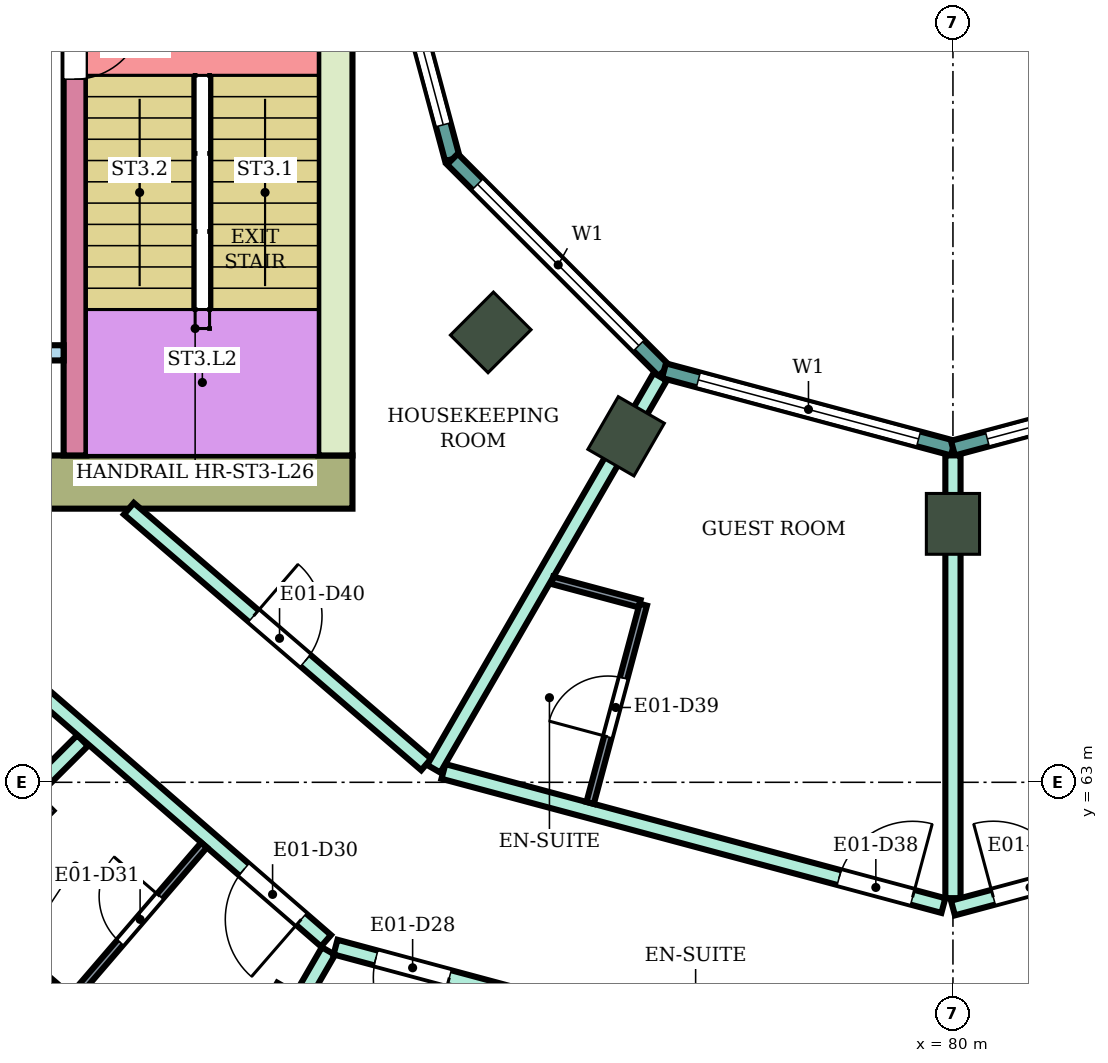
"""IFC4 building model, lengths in metres.
Left out: names, types, materials, properties, quantities, classifications, styles, units other than length and angle.
Written with IfcOpenShell. Run it as: python <this file> out.ifc"""

import sys

from ifc_helpers import new_model, si_unit, direction, frame, frame_2d, origin, origin_2d, place, context, subcontext, project, spatial, rectangle, extrude, element, fill, save


model = new_model("IFC4")
c1 = context("Model", 3, precision=1e-05, world=origin(), true_north=direction((0.0, 1.0)))
c2 = subcontext(c1, "Body", "Model", "MODEL_VIEW")
j1 = project(units=[si_unit("LENGTHUNIT", "METRE"), si_unit("PLANEANGLEUNIT", "RADIAN")], contexts=[c1])
p1 = place(None, origin())
s1 = spatial("IfcSite", under=j1, at=p1, CompositionType="ELEMENT")
p2 = place(p1, origin())
s2 = spatial("IfcBuilding", under=s1, at=p2, CompositionType="ELEMENT")
p3 = place(p2, frame((0.0, 0.0, 114.6)))
s3 = spatial("IfcBuildingStorey", under=s2, at=p3, CompositionType="ELEMENT", Elevation=114.6)
for number, where, z_axis, x_axis in (
    (1, (67.555, 62.555, 0.0), (0.0, 0.0, 1.0), (-0.707, -0.707, 0.0)),
    (2, (71.2, 59.758, 0.0), (0.0, 0.0, 1.0), (-0.5, -0.866, 0.0)),
):
    element("IfcColumn", number, at=place(p3, frame(where, z_axis=z_axis, x_axis=x_axis)), inside=s3, PredefinedType="COLUMN", context=c2, shape_type="SweptSolid", body=[
        extrude(rectangle(XDim=1.0, YDim=0.8, at=origin_2d()), origin(), (0.0, 0.0, 1.0), 3.9),
    ])
for number, where, z_axis, x_axis in (
    (3, (73.919, 68.919, 0.0), (0.0, 0.0, 1.0), (-0.707, -0.707, 0.0)),
    (4, (75.7, 67.552, 0.0), (0.0, 0.0, 1.0), (-0.5, -0.866, 0.0)),
    (5, (80.0, 66.4, 0.0), (0.0, 0.0, 1.0), (0.0, -1.0, 0.0)),
):
    element("IfcColumn", number, at=place(p3, frame(where, z_axis=z_axis, x_axis=x_axis)), inside=s3, PredefinedType="COLUMN", context=c2, shape_type="SweptSolid", body=[
        extrude(rectangle(XDim=0.8, YDim=0.7, at=origin_2d()), origin(), (0.0, 0.0, 1.0), 3.9),
    ])
p4 = place(p3, frame((72.1, 66.95, 0.0), z_axis=(0.0, 0.0, 1.0), x_axis=(-1.0, 0.0, 0.0)))
e6 = element("IfcWall", 6, at=p4, inside=s3, PredefinedType="SHEAR", context=c2, shape_type="SweptSolid", body=[
    extrude(rectangle(XDim=14.8, YDim=0.7, at=frame_2d((7.4, 0.0))), origin(), (0.0, 0.0, 1.0), 3.58),
])
p5 = place(p4, frame((4.2, 0.0, 0.0)))
e7 = element("IfcOpeningElement", 7, at=p5, cuts=e6, PredefinedType="OPENING", context=c2, shape_type="SweptSolid", body=[
    extrude(rectangle(XDim=2.4, YDim=2.4, at=frame_2d((1.2, 1.2))), frame((0.0, 0.36, 0.0), z_axis=(0.0, -1.0, 0.0), x_axis=(1.0, 0.0, 0.0)), (0.0, 0.0, 1.0), 0.72),
])
p6 = place(p3, frame((71.875, 75.0, 0.0), z_axis=(0.0, 0.0, 1.0), x_axis=(0.0, -1.0, 0.0)))
e8 = element("IfcWall", 8, at=p6, inside=s3, PredefinedType="SHEAR", context=c2, shape_type="SweptSolid", body=[
    extrude(rectangle(XDim=7.7, YDim=0.45, at=frame_2d((3.85, 0.0))), origin(), (0.0, 0.0, 1.0), 3.58),
])
p7 = place(p3, frame((68.45, 75.0, 0.0), z_axis=(0.0, 0.0, 1.0), x_axis=(0.0, -1.0, 0.0)))
e9 = element("IfcWall", 9, at=p7, inside=s3, PredefinedType="SHEAR", context=c2, shape_type="SweptSolid", body=[
    extrude(rectangle(XDim=7.7, YDim=0.3, at=frame_2d((3.85, 0.0))), origin(), (0.0, 0.0, 1.0), 3.58),
])
p8 = place(p7, frame((1.85, 0.0, 0.0)))
e10 = element("IfcOpeningElement", 10, at=p8, cuts=e9, PredefinedType="OPENING", context=c2, shape_type="SweptSolid", body=[
    extrude(rectangle(XDim=0.9, YDim=2.1, at=frame_2d((0.45, 1.05))), frame((0.0, 0.16, 0.0), z_axis=(0.0, -1.0, 0.0), x_axis=(1.0, 0.0, 0.0)), (0.0, 0.0, 1.0), 0.32),
])
p9 = place(p3, frame((68.3, 68.65, 0.0), z_axis=(0.0, 0.0, 1.0), x_axis=(-1.0, 0.0, 0.0)))
e11 = element("IfcWall", 11, at=p9, inside=s3, PredefinedType="SHEAR", context=c2, shape_type="SweptSolid", body=[
    extrude(rectangle(XDim=4.5, YDim=0.2, at=frame_2d((2.25, 0.0))), origin(), (0.0, 0.0, 1.0), 3.58),
])
p10 = place(p3, frame((72.396, 75.0, 0.0), z_axis=(0.0, 0.0, 1.0), x_axis=(0.258789828301, -0.965933654434, 0.0)))
e12 = element("IfcWall", 12, at=p10, inside=s3, PredefinedType="NOTDEFINED", context=c2, shape_type="SweptSolid", body=[
    extrude(rectangle(XDim=3.936, YDim=0.2, at=frame_2d((1.968, 0.0))), origin(), (0.0, 0.0, 1.0), 3.9),
])
p11 = place(p10, frame((0.468, 0.0, 0.9)))
e13 = element("IfcOpeningElement", 13, at=p11, cuts=e12, PredefinedType="OPENING", context=c2, shape_type="SweptSolid", body=[
    extrude(rectangle(XDim=3.0, YDim=2.3, at=frame_2d((1.5, 1.15))), frame((0.0, 0.11, 0.0), z_axis=(0.0, -1.0, 0.0), x_axis=(1.0, 0.0, 0.0)), (0.0, 0.0, 1.0), 0.22),
])
p12 = place(p3, frame((73.415, 71.198, 0.0), z_axis=(0.0, 0.0, 1.0), x_axis=(0.707106781187, -0.707106781187, 0.0)))
e14 = element("IfcWall", 14, at=p12, inside=s3, PredefinedType="NOTDEFINED", context=c2, shape_type="SweptSolid", body=[
    extrude(rectangle(XDim=3.936, YDim=0.2, at=frame_2d((1.968, 0.0))), origin(), (0.0, 0.0, 1.0), 3.9),
])
p13 = place(p12, frame((0.468, 0.0, 0.9)))
e15 = element("IfcOpeningElement", 15, at=p13, cuts=e14, PredefinedType="OPENING", context=c2, shape_type="SweptSolid", body=[
    extrude(rectangle(XDim=3.0, YDim=2.3, at=frame_2d((1.5, 1.15))), frame((0.0, 0.11, 0.0), z_axis=(0.0, -1.0, 0.0), x_axis=(1.0, 0.0, 0.0)), (0.0, 0.0, 1.0), 0.22),
])
p14 = place(p3, frame((76.198, 68.415, 0.0), z_axis=(0.0, 0.0, 1.0), x_axis=(0.965933654434, -0.258789828301, 0.0)))
e16 = element("IfcWall", 16, at=p14, inside=s3, PredefinedType="NOTDEFINED", context=c2, shape_type="SweptSolid", body=[
    extrude(rectangle(XDim=3.936, YDim=0.2, at=frame_2d((1.968, 0.0))), origin(), (0.0, 0.0, 1.0), 3.9),
])
p15 = place(p14, frame((0.468, 0.0, 0.9)))
e17 = element("IfcOpeningElement", 17, at=p15, cuts=e16, PredefinedType="OPENING", context=c2, shape_type="SweptSolid", body=[
    extrude(rectangle(XDim=3.0, YDim=2.3, at=frame_2d((1.5, 1.15))), frame((0.0, 0.11, 0.0), z_axis=(0.0, -1.0, 0.0), x_axis=(1.0, 0.0, 0.0)), (0.0, 0.0, 1.0), 0.22),
])
p16 = place(p3, frame((80.0, 67.396, 0.0), z_axis=(0.0, 0.0, 1.0), x_axis=(0.965933654434, 0.258789828301, 0.0)))
e18 = element("IfcWall", 18, at=p16, inside=s3, PredefinedType="NOTDEFINED", context=c2, shape_type="SweptSolid", body=[
    extrude(rectangle(XDim=3.936, YDim=0.2, at=frame_2d((1.968, 0.0))), origin(), (0.0, 0.0, 1.0), 3.9),
])
p17 = place(p16, frame((0.468, 0.0, 0.9)))
e19 = element("IfcOpeningElement", 19, at=p17, cuts=e18, PredefinedType="OPENING", context=c2, shape_type="SweptSolid", body=[
    extrude(rectangle(XDim=3.0, YDim=2.3, at=frame_2d((1.5, 1.15))), frame((0.0, 0.11, 0.0), z_axis=(0.0, -1.0, 0.0), x_axis=(1.0, 0.0, 0.0)), (0.0, 0.0, 1.0), 0.22),
])
p18 = place(p3, frame((63.596, 58.596, 0.0), z_axis=(0.0, 0.0, 1.0), x_axis=(0.707106781187, 0.707106781187, 0.0)))
e20 = element("IfcWall", 20, at=p18, inside=s3, PredefinedType="PARTITIONING", context=c2, shape_type="SweptSolid", body=[
    extrude(rectangle(XDim=7.005, YDim=0.2, at=frame_2d((3.503, 0.0))), origin(), (0.0, 0.0, 1.0), 3.45),
])
p19 = place(p3, frame((67.081, 64.971, 0.0), z_axis=(0.0, 0.0, 1.0), x_axis=(0.755031061605, -0.65568902386, 0.0)))
e21 = element("IfcWall", 21, at=p19, inside=s3, PredefinedType="PARTITIONING", context=c2, shape_type="SweptSolid", body=[
    extrude(rectangle(XDim=6.186, YDim=0.2, at=frame_2d((3.093, 0.0))), origin(), (0.0, 0.0, 1.0), 3.45),
])
p20 = place(p19, frame((4.755, 0.0, 0.0)))
e22 = element("IfcOpeningElement", 22, at=p20, cuts=e21, PredefinedType="OPENING", context=c2, shape_type="SweptSolid", body=[
    extrude(rectangle(XDim=1.0, YDim=2.1, at=frame_2d((0.5, 1.05))), frame((0.0, 0.11, 0.0), z_axis=(0.0, -1.0, 0.0), x_axis=(1.0, 0.0, 0.0)), (0.0, 0.0, 1.0), 0.22),
])
p21 = place(p3, frame((67.094, 52.663, 0.0), z_axis=(0.0, 0.0, 1.0), x_axis=(0.500228134253, 0.865893650342, 0.0)))
e23 = element("IfcWall", 23, at=p21, inside=s3, PredefinedType="PARTITIONING", context=c2, shape_type="SweptSolid", body=[
    extrude(rectangle(XDim=9.375, YDim=0.2, at=frame_2d((4.687, 0.0))), origin(), (0.0, 0.0, 1.0), 3.45),
])
p22 = place(p3, frame((69.158, 66.6, 0.0), z_axis=(0.0, 0.0, 1.0), x_axis=(0.758063092745, -0.652181222835, 0.0)))
e24 = element("IfcWall", 24, at=p22, inside=s3, PredefinedType="PARTITIONING", context=c2, shape_type="SweptSolid", body=[
    extrude(rectangle(XDim=5.16, YDim=0.2, at=frame_2d((2.58, 0.0))), origin(), (0.0, 0.0, 1.0), 3.45),
])
p23 = place(p22, frame((2.165, 0.0, 0.0)))
e25 = element("IfcOpeningElement", 25, at=p23, cuts=e24, PredefinedType="OPENING", context=c2, shape_type="SweptSolid", body=[
    extrude(rectangle(XDim=0.9, YDim=2.1, at=frame_2d((0.45, 1.05))), frame((0.0, 0.11, 0.0), z_axis=(0.0, -1.0, 0.0), x_axis=(1.0, 0.0, 0.0)), (0.0, 0.0, 1.0), 0.22),
])
p24 = place(p3, frame((71.877, 60.832, 0.0), z_axis=(0.0, 0.0, 1.0), x_axis=(0.965857276008, -0.259074742848, 0.0)))
e26 = element("IfcWall", 26, at=p24, inside=s3, PredefinedType="PARTITIONING", context=c2, shape_type="SweptSolid", body=[
    extrude(rectangle(XDim=8.36, YDim=0.2, at=frame_2d((4.18, 0.0))), origin(), (0.0, 0.0, 1.0), 3.45),
])
p25 = place(p24, frame((0.55, 0.0, 0.0)))
e27 = element("IfcOpeningElement", 27, at=p25, cuts=e26, PredefinedType="OPENING", context=c2, shape_type="SweptSolid", body=[
    extrude(rectangle(XDim=1.0, YDim=2.1, at=frame_2d((0.5, 1.05))), frame((0.0, 0.11, 0.0), z_axis=(0.0, -1.0, 0.0), x_axis=(1.0, 0.0, 0.0)), (0.0, 0.0, 1.0), 0.22),
])
p26 = place(p3, frame((73.297, 63.143, 0.0), z_axis=(0.0, 0.0, 1.0), x_axis=(0.965859030528, -0.25906820173, 0.0)))
e28 = element("IfcWall", 28, at=p26, inside=s3, PredefinedType="PARTITIONING", context=c2, shape_type="SweptSolid", body=[
    extrude(rectangle(XDim=6.81, YDim=0.2, at=frame_2d((3.405, 0.0))), origin(), (0.0, 0.0, 1.0), 3.45),
])
p27 = place(p26, frame((5.39, 0.0, 0.0)))
e29 = element("IfcOpeningElement", 29, at=p27, cuts=e28, PredefinedType="OPENING", context=c2, shape_type="SweptSolid", body=[
    extrude(rectangle(XDim=1.0, YDim=2.1, at=frame_2d((0.5, 1.05))), frame((0.0, 0.11, 0.0), z_axis=(0.0, -1.0, 0.0), x_axis=(1.0, 0.0, 0.0)), (0.0, 0.0, 1.0), 0.22),
])
p28 = place(p3, frame((73.169, 63.178, 0.0), z_axis=(0.0, 0.0, 1.0), x_axis=(0.500239348149, 0.865887171959, 0.0)))
e30 = element("IfcWall", 30, at=p28, inside=s3, PredefinedType="PARTITIONING", context=c2, shape_type="SweptSolid", body=[
    extrude(rectangle(XDim=5.955, YDim=0.2, at=frame_2d((2.978, 0.0))), origin(), (0.0, 0.0, 1.0), 3.45),
])
p29 = place(p3, frame((80.0, 58.655, 0.0), z_axis=(0.0, 0.0, 1.0), x_axis=(0.965967338894, 0.258664068224, 0.0)))
e31 = element("IfcWall", 31, at=p29, inside=s3, PredefinedType="PARTITIONING", context=c2, shape_type="SweptSolid", body=[
    extrude(rectangle(XDim=8.36, YDim=0.2, at=frame_2d((4.18, 0.0))), origin(), (0.0, 0.0, 1.0), 3.45),
])
p30 = place(p29, frame((6.86, 0.0, 0.0)))
e32 = element("IfcOpeningElement", 32, at=p30, cuts=e31, PredefinedType="OPENING", context=c2, shape_type="SweptSolid", body=[
    extrude(rectangle(XDim=1.0, YDim=2.1, at=frame_2d((0.5, 1.05))), frame((0.0, 0.11, 0.0), z_axis=(0.0, -1.0, 0.0), x_axis=(1.0, 0.0, 0.0)), (0.0, 0.0, 1.0), 0.22),
])
p31 = place(p29, frame((2.7, 0.0, 0.0)))
e33 = element("IfcOpeningElement", 33, at=p31, cuts=e31, PredefinedType="OPENING", context=c2, shape_type="SweptSolid", body=[
    extrude(rectangle(XDim=1.0, YDim=2.1, at=frame_2d((0.5, 1.05))), frame((0.0, 0.11, 0.0), z_axis=(0.0, -1.0, 0.0), x_axis=(1.0, 0.0, 0.0)), (0.0, 0.0, 1.0), 0.22),
])
p32 = place(p3, frame((80.0, 61.476, 0.0), z_axis=(0.0, 0.0, 1.0), x_axis=(0.0, 1.0, 0.0)))
e34 = element("IfcWall", 34, at=p32, inside=s3, PredefinedType="PARTITIONING", context=c2, shape_type="SweptSolid", body=[
    extrude(rectangle(XDim=5.825, YDim=0.2, at=frame_2d((2.913, 0.0))), origin(), (0.0, 0.0, 1.0), 3.45),
])
p33 = place(p3, frame((80.0, 61.346, 0.0), z_axis=(0.0, 0.0, 1.0), x_axis=(0.965924181808, 0.258825182312, 0.0)))
e35 = element("IfcWall", 35, at=p33, inside=s3, PredefinedType="PARTITIONING", context=c2, shape_type="SweptSolid", body=[
    extrude(rectangle(XDim=6.94, YDim=0.2, at=frame_2d((3.47, 0.0))), origin(), (0.0, 0.0, 1.0), 3.45),
])
p34 = place(p33, frame((0.55, 0.0, 0.0)))
e36 = element("IfcOpeningElement", 36, at=p34, cuts=e35, PredefinedType="OPENING", context=c2, shape_type="SweptSolid", body=[
    extrude(rectangle(XDim=1.0, YDim=2.1, at=frame_2d((0.5, 1.05))), frame((0.0, 0.11, 0.0), z_axis=(0.0, -1.0, 0.0), x_axis=(1.0, 0.0, 0.0)), (0.0, 0.0, 1.0), 0.22),
])
p35 = place(p3, frame((65.209, 62.875, 0.0), z_axis=(0.0, 0.0, 1.0), x_axis=(0.757930378138, -0.652335451969, 0.0)))
e37 = element("IfcWall", 37, at=p35, inside=s3, PredefinedType="PARTITIONING", context=c2, shape_type="SweptSolid", body=[
    extrude(rectangle(XDim=4.15, YDim=0.1, at=frame_2d((2.075, 0.0))), origin(), (0.0, 0.0, 1.0), 3.45),
])
p36 = place(p3, frame((68.393, 60.135, 0.0), z_axis=(0.0, 0.0, 1.0), x_axis=(0.652061182569, 0.758166349944, 0.0)))
e38 = element("IfcWall", 38, at=p36, inside=s3, PredefinedType="PARTITIONING", context=c2, shape_type="SweptSolid", body=[
    extrude(rectangle(XDim=2.69, YDim=0.1, at=frame_2d((1.345, 0.0))), origin(), (0.0, 0.0, 1.0), 3.45),
])
p37 = place(p36, frame((1.0, 0.0, 0.0)))
e39 = element("IfcOpeningElement", 39, at=p37, cuts=e38, PredefinedType="OPENING", context=c2, shape_type="SweptSolid", body=[
    extrude(rectangle(XDim=0.8, YDim=2.1, at=frame_2d((0.4, 1.05))), frame((0.0, 0.06, 0.0), z_axis=(0.0, -1.0, 0.0), x_axis=(1.0, 0.0, 0.0)), (0.0, 0.0, 1.0), 0.12),
])
p38 = place(p3, frame((74.729, 65.657, 0.0), z_axis=(0.0, 0.0, 1.0), x_axis=(0.965948051503, -0.258736085224, 0.0)))
e40 = element("IfcWall", 40, at=p38, inside=s3, PredefinedType="PARTITIONING", context=c2, shape_type="SweptSolid", body=[
    extrude(rectangle(XDim=1.189, YDim=0.1, at=frame_2d((0.594, 0.0))), origin(), (0.0, 0.0, 1.0), 3.45),
])
p39 = place(p3, frame((75.227, 62.729, 0.0), z_axis=(0.0, 0.0, 1.0), x_axis=(0.258945475746, 0.965891940432, 0.0)))
e41 = element("IfcWall", 41, at=p39, inside=s3, PredefinedType="PARTITIONING", context=c2, shape_type="SweptSolid", body=[
    extrude(rectangle(XDim=2.7, YDim=0.1, at=frame_2d((1.35, 0.0))), origin(), (0.0, 0.0, 1.0), 3.45),
])
p40 = place(p39, frame((0.9, 0.0, 0.0)))
e42 = element("IfcOpeningElement", 42, at=p40, cuts=e41, PredefinedType="OPENING", context=c2, shape_type="SweptSolid", body=[
    extrude(rectangle(XDim=0.8, YDim=2.1, at=frame_2d((0.4, 1.05))), frame((0.0, 0.06, 0.0), z_axis=(0.0, -1.0, 0.0), x_axis=(1.0, 0.0, 0.0)), (0.0, 0.0, 1.0), 0.12),
])
p41 = place(p11, origin())
e43 = element("IfcWindow", 43, at=p41, inside=s3, PartitioningType="SINGLE_PANEL", PredefinedType="WINDOW", context=c2, shape_type="SweptSolid", body=[
    extrude(rectangle(XDim=3.0, YDim=2.3, at=frame_2d((1.5, 1.15))), frame((0.0, 0.03, 0.0), z_axis=(0.0, -1.0, 0.0), x_axis=(1.0, 0.0, 0.0)), (0.0, 0.0, 1.0), 0.06),
])
fill(e13, e43)
p42 = place(p13, origin())
e44 = element("IfcWindow", 44, at=p42, inside=s3, PartitioningType="SINGLE_PANEL", PredefinedType="WINDOW", context=c2, shape_type="SweptSolid", body=[
    extrude(rectangle(XDim=3.0, YDim=2.3, at=frame_2d((1.5, 1.15))), frame((0.0, 0.03, 0.0), z_axis=(0.0, -1.0, 0.0), x_axis=(1.0, 0.0, 0.0)), (0.0, 0.0, 1.0), 0.06),
])
fill(e15, e44)
p43 = place(p15, origin())
e45 = element("IfcWindow", 45, at=p43, inside=s3, PartitioningType="SINGLE_PANEL", PredefinedType="WINDOW", context=c2, shape_type="SweptSolid", body=[
    extrude(rectangle(XDim=3.0, YDim=2.3, at=frame_2d((1.5, 1.15))), frame((0.0, 0.03, 0.0), z_axis=(0.0, -1.0, 0.0), x_axis=(1.0, 0.0, 0.0)), (0.0, 0.0, 1.0), 0.06),
])
fill(e17, e45)
p44 = place(p17, origin())
e46 = element("IfcWindow", 46, at=p44, inside=s3, PartitioningType="SINGLE_PANEL", PredefinedType="WINDOW", context=c2, shape_type="SweptSolid", body=[
    extrude(rectangle(XDim=3.0, YDim=2.3, at=frame_2d((1.5, 1.15))), frame((0.0, 0.03, 0.0), z_axis=(0.0, -1.0, 0.0), x_axis=(1.0, 0.0, 0.0)), (0.0, 0.0, 1.0), 0.06),
])
fill(e19, e46)
p45 = place(p25, frame((1.0, 0.0, 0.0), z_axis=(0.0, 0.0, 1.0), x_axis=(-1.0, 0.0, 0.0)))
e47 = element("IfcDoor", 47, at=p45, inside=s3, OperationType="SINGLE_SWING_LEFT", PredefinedType="DOOR", context=c2, shape_type="SweptSolid", body=[
    extrude(rectangle(XDim=1.0, YDim=2.1, at=frame_2d((0.5, 1.05))), frame((0.0, 0.025, 0.0), z_axis=(0.0, -1.0, 0.0), x_axis=(1.0, 0.0, 0.0)), (0.0, 0.0, 1.0), 0.05),
])
fill(e27, e47)
p46 = place(p20, frame((1.0, 0.0, 0.0), z_axis=(0.0, 0.0, 1.0), x_axis=(-1.0, 0.0, 0.0)))
e48 = element("IfcDoor", 48, at=p46, inside=s3, OperationType="SINGLE_SWING_LEFT", PredefinedType="DOOR", context=c2, shape_type="SweptSolid", body=[
    extrude(rectangle(XDim=1.0, YDim=2.1, at=frame_2d((0.5, 1.05))), frame((0.0, 0.025, 0.0), z_axis=(0.0, -1.0, 0.0), x_axis=(1.0, 0.0, 0.0)), (0.0, 0.0, 1.0), 0.05),
])
fill(e22, e48)
p47 = place(p37, origin())
e49 = element("IfcDoor", 49, at=p47, inside=s3, OperationType="SINGLE_SWING_RIGHT", PredefinedType="DOOR", context=c2, shape_type="SweptSolid", body=[
    extrude(rectangle(XDim=0.8, YDim=2.1, at=frame_2d((0.4, 1.05))), frame((0.0, 0.025, 0.0), z_axis=(0.0, -1.0, 0.0), x_axis=(1.0, 0.0, 0.0)), (0.0, 0.0, 1.0), 0.05),
])
fill(e39, e49)
p48 = place(p34, origin())
e50 = element("IfcDoor", 50, at=p48, inside=s3, OperationType="SINGLE_SWING_LEFT", PredefinedType="DOOR", context=c2, shape_type="SweptSolid", body=[
    extrude(rectangle(XDim=1.0, YDim=2.1, at=frame_2d((0.5, 1.05))), frame((0.0, 0.025, 0.0), z_axis=(0.0, -1.0, 0.0), x_axis=(1.0, 0.0, 0.0)), (0.0, 0.0, 1.0), 0.05),
])
fill(e36, e50)
p49 = place(p27, origin())
e51 = element("IfcDoor", 51, at=p49, inside=s3, OperationType="SINGLE_SWING_RIGHT", PredefinedType="DOOR", context=c2, shape_type="SweptSolid", body=[
    extrude(rectangle(XDim=1.0, YDim=2.1, at=frame_2d((0.5, 1.05))), frame((0.0, 0.025, 0.0), z_axis=(0.0, -1.0, 0.0), x_axis=(1.0, 0.0, 0.0)), (0.0, 0.0, 1.0), 0.05),
])
fill(e29, e51)
p50 = place(p40, origin())
e52 = element("IfcDoor", 52, at=p50, inside=s3, OperationType="SINGLE_SWING_LEFT", PredefinedType="DOOR", context=c2, shape_type="SweptSolid", body=[
    extrude(rectangle(XDim=0.8, YDim=2.1, at=frame_2d((0.4, 1.05))), frame((0.0, 0.025, 0.0), z_axis=(0.0, -1.0, 0.0), x_axis=(1.0, 0.0, 0.0)), (0.0, 0.0, 1.0), 0.05),
])
fill(e42, e52)
p51 = place(p23, origin())
e53 = element("IfcDoor", 53, at=p51, inside=s3, OperationType="SINGLE_SWING_LEFT", PredefinedType="DOOR", context=c2, shape_type="SweptSolid", body=[
    extrude(rectangle(XDim=0.9, YDim=2.1, at=frame_2d((0.45, 1.05))), frame((0.0, 0.025, 0.0), z_axis=(0.0, -1.0, 0.0), x_axis=(1.0, 0.0, 0.0)), (0.0, 0.0, 1.0), 0.05),
])
fill(e25, e53)
p52 = place(p8, origin())
e54 = element("IfcDoor", 54, at=p52, inside=s3, OperationType="SINGLE_SWING_LEFT", PredefinedType="DOOR", context=c2, shape_type="SweptSolid", body=[
    extrude(rectangle(XDim=0.9, YDim=2.1, at=frame_2d((0.45, 1.05))), frame((0.0, 0.025, 0.0), z_axis=(0.0, -1.0, 0.0), x_axis=(1.0, 0.0, 0.0)), (0.0, 0.0, 1.0), 0.05),
])
fill(e10, e54)
save(model, sys.argv[1])
